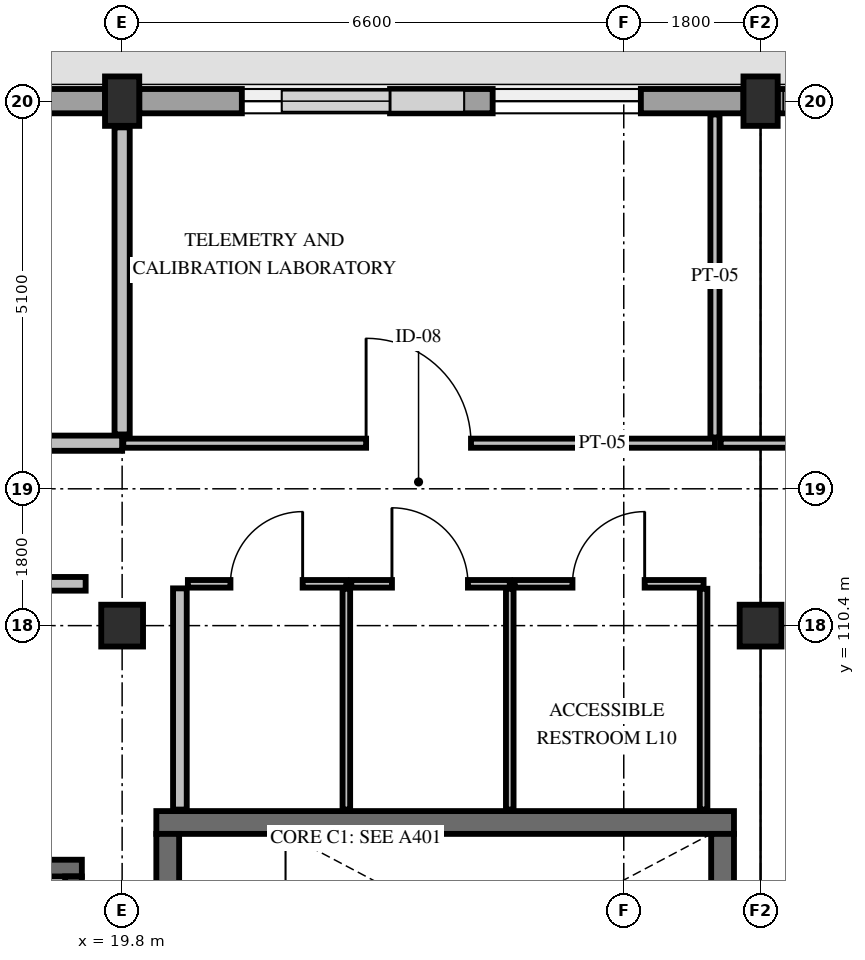
"""IFC4 building model, lengths in metres.
Left out: names, types, materials, properties, quantities, classifications, styles, units other than length and angle.
Written with IfcOpenShell. Run it as: python <this file> out.ifc"""

import sys

from ifc_helpers import new_model, si_unit, direction, frame, frame_2d, origin, origin_2d, place, context, subcontext, project, spatial, rectangle, extrude, element, fill, save


model = new_model("IFC4")
c1 = context("Model", 3, precision=1e-05, world=origin(), true_north=direction((0.0, 1.0)))
c2 = subcontext(c1, "Body", "Model", "MODEL_VIEW")
j1 = project(units=[si_unit("LENGTHUNIT", "METRE"), si_unit("PLANEANGLEUNIT", "RADIAN")], contexts=[c1])
p1 = place(None, origin())
s1 = spatial("IfcSite", under=j1, at=p1, CompositionType="ELEMENT")
p2 = place(p1, origin())
s2 = spatial("IfcBuilding", under=s1, at=p2, CompositionType="ELEMENT")
p3 = place(p2, frame((0.0, 0.0, 46.8)))
s3 = spatial("IfcBuildingStorey", under=s2, at=p3, CompositionType="ELEMENT", Elevation=46.8)
p4 = place(p3, frame((19.8, 110.4, 0.0), z_axis=(0.0, 0.0, 1.0), x_axis=(1.0, 0.0, 0.0)))
e1 = element("IfcColumn", 1, at=p4, inside=s3, PredefinedType="COLUMN", context=c2, shape_type="SweptSolid", body=[
    extrude(rectangle(XDim=0.55, YDim=0.55, at=origin_2d()), origin(), (0.0, 0.0, 1.0), 4.2),
])
p5 = place(p3, frame((19.8, 117.3, 0.0), z_axis=(0.0, 0.0, 1.0), x_axis=(1.0, 0.0, 0.0)))
e2 = element("IfcColumn", 2, at=p5, inside=s3, PredefinedType="PILASTER", context=c2, shape_type="SweptSolid", body=[
    extrude(rectangle(XDim=0.45, YDim=0.65, at=origin_2d()), origin(), (0.0, 0.0, 1.0), 4.2),
])
p6 = place(p3, frame((28.2, 110.4, 0.0), z_axis=(0.0, 0.0, 1.0), x_axis=(1.0, 0.0, 0.0)))
e3 = element("IfcColumn", 3, at=p6, inside=s3, PredefinedType="COLUMN", context=c2, shape_type="SweptSolid", body=[
    extrude(rectangle(XDim=0.55, YDim=0.55, at=origin_2d()), origin(), (0.0, 0.0, 1.0), 4.2),
])
p7 = place(p3, frame((28.2, 117.3, 0.0), z_axis=(0.0, 0.0, 1.0), x_axis=(1.0, 0.0, 0.0)))
e4 = element("IfcColumn", 4, at=p7, inside=s3, PredefinedType="PILASTER", context=c2, shape_type="SweptSolid", body=[
    extrude(rectangle(XDim=0.45, YDim=0.65, at=origin_2d()), origin(), (0.0, 0.0, 1.0), 4.2),
])
p8 = place(p3, frame((13.425, 117.3, 0.0), z_axis=(0.0, 0.0, 1.0), x_axis=(1.0, 0.0, 0.0)))
e5 = element("IfcWall", 5, at=p8, inside=s3, PredefinedType="STANDARD", context=c2, shape_type="SweptSolid", body=[
    extrude(rectangle(XDim=6.15, YDim=0.32, at=frame_2d((3.075, 0.0))), origin(), (0.0, 0.0, 1.0), 3.33),
])
p9 = place(p8, frame((0.75, 0.0, 0.65)))
e6 = element("IfcOpeningElement", 6, at=p9, cuts=e5, PredefinedType="OPENING", context=c2, shape_type="SweptSolid", body=[
    extrude(rectangle(XDim=1.95, YDim=2.24, at=frame_2d((0.975, 1.12))), frame((0.0, 0.175, 0.0), z_axis=(0.0, -1.0, 0.0), x_axis=(1.0, 0.0, 0.0)), (0.0, 0.0, 1.0), 0.35),
])
p10 = place(p8, frame((3.45, 0.0, 0.65)))
e7 = element("IfcOpeningElement", 7, at=p10, cuts=e5, PredefinedType="OPENING", context=c2, shape_type="SweptSolid", body=[
    extrude(rectangle(XDim=1.95, YDim=2.24, at=frame_2d((0.975, 1.12))), frame((0.0, 0.175, 0.0), z_axis=(0.0, -1.0, 0.0), x_axis=(1.0, 0.0, 0.0)), (0.0, 0.0, 1.0), 0.35),
])
p11 = place(p3, frame((20.025, 117.3, 0.0), z_axis=(0.0, 0.0, 1.0), x_axis=(1.0, 0.0, 0.0)))
e8 = element("IfcWall", 8, at=p11, inside=s3, PredefinedType="STANDARD", context=c2, shape_type="SweptSolid", body=[
    extrude(rectangle(XDim=7.95, YDim=0.32, at=frame_2d((3.975, 0.0))), origin(), (0.0, 0.0, 1.0), 3.33),
])
p12 = place(p11, frame((1.35, 0.0, 0.65)))
e9 = element("IfcOpeningElement", 9, at=p12, cuts=e8, PredefinedType="OPENING", context=c2, shape_type="SweptSolid", body=[
    extrude(rectangle(XDim=1.95, YDim=2.24, at=frame_2d((0.975, 1.12))), frame((0.0, 0.175, 0.0), z_axis=(0.0, -1.0, 0.0), x_axis=(1.0, 0.0, 0.0)), (0.0, 0.0, 1.0), 0.35),
])
p13 = place(p11, frame((4.65, 0.0, 0.65)))
e10 = element("IfcOpeningElement", 10, at=p13, cuts=e8, PredefinedType="OPENING", context=c2, shape_type="SweptSolid", body=[
    extrude(rectangle(XDim=1.95, YDim=2.24, at=frame_2d((0.975, 1.12))), frame((0.0, 0.175, 0.0), z_axis=(0.0, -1.0, 0.0), x_axis=(1.0, 0.0, 0.0)), (0.0, 0.0, 1.0), 0.35),
])
p14 = place(p3, frame((28.425, 117.3, 0.0), z_axis=(0.0, 0.0, 1.0), x_axis=(1.0, 0.0, 0.0)))
e11 = element("IfcWall", 11, at=p14, inside=s3, PredefinedType="STANDARD", context=c2, shape_type="SweptSolid", body=[
    extrude(rectangle(XDim=4.35, YDim=0.32, at=frame_2d((2.175, 0.0))), origin(), (0.0, 0.0, 1.0), 3.35),
])
p15 = place(p14, frame((1.2, 0.0, 0.65)))
e12 = element("IfcOpeningElement", 12, at=p15, cuts=e11, PredefinedType="OPENING", context=c2, shape_type="SweptSolid", body=[
    extrude(rectangle(XDim=1.95, YDim=2.24, at=frame_2d((0.975, 1.12))), frame((0.0, 0.175, 0.0), z_axis=(0.0, -1.0, 0.0), x_axis=(1.0, 0.0, 0.0)), (0.0, 0.0, 1.0), 0.35),
])
p16 = place(p3, frame((20.25, 107.81, 0.0), z_axis=(0.0, 0.0, 1.0), x_axis=(1.0, 0.0, 0.0)))
e13 = element("IfcWall", 13, at=p16, inside=s3, PredefinedType="SHEAR", context=c2, shape_type="SweptSolid", body=[
    extrude(rectangle(XDim=7.6, YDim=0.3, at=frame_2d((3.8, 0.0))), origin(), (0.0, 0.0, 1.0), 3.94),
])
p17 = place(p3, frame((20.4, 104.7, 0.0), z_axis=(0.0, 0.0, 1.0), x_axis=(0.0, 1.0, 0.0)))
e14 = element("IfcWall", 14, at=p17, inside=s3, PredefinedType="SHEAR", context=c2, shape_type="SweptSolid", body=[
    extrude(rectangle(XDim=2.96, YDim=0.3, at=frame_2d((1.48, 0.0))), origin(), (0.0, 0.0, 1.0), 3.94),
])
p18 = place(p17, frame((0.92, 0.0, 0.0)))
e15 = element("IfcOpeningElement", 15, at=p18, cuts=e14, PredefinedType="OPENING", context=c2, shape_type="SweptSolid", body=[
    extrude(rectangle(XDim=1.12, YDim=2.2, at=frame_2d((0.56, 1.1))), frame((0.0, 0.165, 0.0), z_axis=(0.0, -1.0, 0.0), x_axis=(1.0, 0.0, 0.0)), (0.0, 0.0, 1.0), 0.33),
])
p19 = place(p3, frame((27.7, 104.7, 0.0), z_axis=(0.0, 0.0, 1.0), x_axis=(0.0, 1.0, 0.0)))
e16 = element("IfcWall", 16, at=p19, inside=s3, PredefinedType="SHEAR", context=c2, shape_type="SweptSolid", body=[
    extrude(rectangle(XDim=2.96, YDim=0.3, at=frame_2d((1.48, 0.0))), origin(), (0.0, 0.0, 1.0), 3.94),
])
p20 = place(p3, frame((16.38, 107.21, 0.0), z_axis=(0.0, 0.0, 1.0), x_axis=(1.0, 0.0, 0.0)))
e17 = element("IfcWall", 17, at=p20, inside=s3, PredefinedType="SHEAR", context=c2, shape_type="SweptSolid", body=[
    extrude(rectangle(XDim=2.89, YDim=0.22, at=frame_2d((1.445, 0.0))), origin(), (0.0, 0.0, 1.0), 3.94),
])
p21 = place(p20, frame((0.845, 0.0, 0.0)))
e18 = element("IfcOpeningElement", 18, at=p21, cuts=e17, PredefinedType="OPENING", context=c2, shape_type="SweptSolid", body=[
    extrude(rectangle(XDim=1.2, YDim=2.2, at=frame_2d((0.6, 1.1))), frame((0.0, 0.125, 0.0), z_axis=(0.0, -1.0, 0.0), x_axis=(1.0, 0.0, 0.0)), (0.0, 0.0, 1.0), 0.25),
])
p22 = place(p3, frame((19.16, 104.7, 0.0), z_axis=(0.0, 0.0, 1.0), x_axis=(0.0, 1.0, 0.0)))
e19 = element("IfcWall", 19, at=p22, inside=s3, PredefinedType="SHEAR", context=c2, shape_type="SweptSolid", body=[
    extrude(rectangle(XDim=2.4, YDim=0.22, at=frame_2d((1.2, 0.0))), origin(), (0.0, 0.0, 1.0), 3.94),
])
p23 = place(p3, frame((13.85, 110.95, 0.0), z_axis=(0.0, 0.0, 1.0), x_axis=(1.0, 0.0, 0.0)))
e20 = element("IfcWall", 20, at=p23, inside=s3, PredefinedType="PARTITIONING", context=c2, shape_type="SweptSolid", body=[
    extrude(rectangle(XDim=5.47, YDim=0.18, at=frame_2d((2.735, 0.0))), origin(), (0.0, 0.0, 1.0), 3.9),
])
p24 = place(p23, frame((1.85, 0.0, 0.0)))
e21 = element("IfcOpeningElement", 21, at=p24, cuts=e20, PredefinedType="OPENING", context=c2, shape_type="SweptSolid", body=[
    extrude(rectangle(XDim=1.6, YDim=2.25, at=frame_2d((0.8, 1.125))), frame((0.0, 0.105, 0.0), z_axis=(0.0, -1.0, 0.0), x_axis=(1.0, 0.0, 0.0)), (0.0, 0.0, 1.0), 0.21),
])
p25 = place(p3, frame((20.56, 107.98, 0.0), z_axis=(0.0, 0.0, 1.0), x_axis=(0.0, 1.0, 0.0)))
e22 = element("IfcWall", 22, at=p25, inside=s3, PredefinedType="PARTITIONING", context=c2, shape_type="SweptSolid", body=[
    extrude(rectangle(XDim=2.91, YDim=0.18, at=frame_2d((1.455, 0.0))), origin(), (0.0, 0.0, 1.0), 3.23),
])
p26 = place(p3, frame((20.665, 110.95, 0.0), z_axis=(0.0, 0.0, 1.0), x_axis=(1.0, 0.0, 0.0)))
e23 = element("IfcWall", 23, at=p26, inside=s3, PredefinedType="PARTITIONING", context=c2, shape_type="SweptSolid", body=[
    extrude(rectangle(XDim=2.085, YDim=0.1, at=frame_2d((1.042, 0.0))), origin(), (0.0, 0.0, 1.0), 3.9),
])
p27 = place(p26, frame((0.56, 0.0, 0.0)))
e24 = element("IfcOpeningElement", 24, at=p27, cuts=e23, PredefinedType="OPENING", context=c2, shape_type="SweptSolid", body=[
    extrude(rectangle(XDim=0.95, YDim=2.15, at=frame_2d((0.475, 1.075))), frame((0.0, 0.065, 0.0), z_axis=(0.0, -1.0, 0.0), x_axis=(1.0, 0.0, 0.0)), (0.0, 0.0, 1.0), 0.13),
])
p28 = place(p3, frame((22.75, 107.98, 0.0), z_axis=(0.0, 0.0, 1.0), x_axis=(0.0, 1.0, 0.0)))
e25 = element("IfcWall", 25, at=p28, inside=s3, PredefinedType="PARTITIONING", context=c2, shape_type="SweptSolid", body=[
    extrude(rectangle(XDim=2.905, YDim=0.1, at=frame_2d((1.453, 0.0))), origin(), (0.0, 0.0, 1.0), 3.23),
])
p29 = place(p3, frame((22.815, 110.95, 0.0), z_axis=(0.0, 0.0, 1.0), x_axis=(1.0, 0.0, 0.0)))
e26 = element("IfcWall", 26, at=p29, inside=s3, PredefinedType="PARTITIONING", context=c2, shape_type="SweptSolid", body=[
    extrude(rectangle(XDim=2.085, YDim=0.1, at=frame_2d((1.042, 0.0))), origin(), (0.0, 0.0, 1.0), 3.9),
])
p30 = place(p29, frame((0.535, 0.0, 0.0)))
e27 = element("IfcOpeningElement", 27, at=p30, cuts=e26, PredefinedType="OPENING", context=c2, shape_type="SweptSolid", body=[
    extrude(rectangle(XDim=1.0, YDim=2.15, at=frame_2d((0.5, 1.075))), frame((0.0, 0.065, 0.0), z_axis=(0.0, -1.0, 0.0), x_axis=(1.0, 0.0, 0.0)), (0.0, 0.0, 1.0), 0.13),
])
p31 = place(p3, frame((24.9, 107.98, 0.0), z_axis=(0.0, 0.0, 1.0), x_axis=(0.0, 1.0, 0.0)))
e28 = element("IfcWall", 28, at=p31, inside=s3, PredefinedType="PARTITIONING", context=c2, shape_type="SweptSolid", body=[
    extrude(rectangle(XDim=2.905, YDim=0.1, at=frame_2d((1.453, 0.0))), origin(), (0.0, 0.0, 1.0), 3.23),
])
p32 = place(p3, frame((24.965, 110.95, 0.0), z_axis=(0.0, 0.0, 1.0), x_axis=(1.0, 0.0, 0.0)))
e29 = element("IfcWall", 29, at=p32, inside=s3, PredefinedType="PARTITIONING", context=c2, shape_type="SweptSolid", body=[
    extrude(rectangle(XDim=2.485, YDim=0.1, at=frame_2d((1.242, 0.0))), origin(), (0.0, 0.0, 1.0), 3.9),
])
p33 = place(p32, frame((0.76, 0.0, 0.0)))
e30 = element("IfcOpeningElement", 30, at=p33, cuts=e29, PredefinedType="OPENING", context=c2, shape_type="SweptSolid", body=[
    extrude(rectangle(XDim=0.95, YDim=2.15, at=frame_2d((0.475, 1.075))), frame((0.0, 0.065, 0.0), z_axis=(0.0, -1.0, 0.0), x_axis=(1.0, 0.0, 0.0)), (0.0, 0.0, 1.0), 0.13),
])
p34 = place(p3, frame((27.45, 107.98, 0.0), z_axis=(0.0, 0.0, 1.0), x_axis=(0.0, 1.0, 0.0)))
e31 = element("IfcWall", 31, at=p34, inside=s3, PredefinedType="PARTITIONING", context=c2, shape_type="SweptSolid", body=[
    extrude(rectangle(XDim=2.905, YDim=0.1, at=frame_2d((1.453, 0.0))), origin(), (0.0, 0.0, 1.0), 3.23),
])
p35 = place(p3, frame((13.315, 112.8, 0.0), z_axis=(0.0, 0.0, 1.0), x_axis=(1.0, 0.0, 0.0)))
e32 = element("IfcWall", 32, at=p35, inside=s3, PredefinedType="PARTITIONING", context=c2, shape_type="SweptSolid", body=[
    extrude(rectangle(XDim=6.485, YDim=0.2, at=frame_2d((3.243, 0.0))), origin(), (0.0, 0.0, 1.0), 3.53),
])
p36 = place(p35, frame((2.305, 0.0, 0.0)))
e33 = element("IfcOpeningElement", 33, at=p36, cuts=e32, PredefinedType="OPENING", context=c2, shape_type="SweptSolid", body=[
    extrude(rectangle(XDim=1.76, YDim=2.35, at=frame_2d((0.88, 1.175))), frame((0.0, 0.115, 0.0), z_axis=(0.0, -1.0, 0.0), x_axis=(1.0, 0.0, 0.0)), (0.0, 0.0, 1.0), 0.23),
])
p37 = place(p3, frame((19.8, 112.915, 0.0), z_axis=(0.0, 0.0, 1.0), x_axis=(0.0, 1.0, 0.0)))
e34 = element("IfcWall", 34, at=p37, inside=s3, PredefinedType="PARTITIONING", context=c2, shape_type="SweptSolid", body=[
    extrude(rectangle(XDim=4.04, YDim=0.2, at=frame_2d((2.02, 0.0))), origin(), (0.0, 0.0, 1.0), 3.53),
])
p38 = place(p3, frame((19.815, 112.8, 0.0), z_axis=(0.0, 0.0, 1.0), x_axis=(1.0, 0.0, 0.0)))
e35 = element("IfcWall", 35, at=p38, inside=s3, PredefinedType="PARTITIONING", context=c2, shape_type="SweptSolid", body=[
    extrude(rectangle(XDim=7.785, YDim=0.12, at=frame_2d((3.893, 0.0))), origin(), (0.0, 0.0, 1.0), 3.53),
])
p39 = place(p38, frame((3.195, 0.0, 0.0)))
e36 = element("IfcOpeningElement", 36, at=p39, cuts=e35, PredefinedType="OPENING", context=c2, shape_type="SweptSolid", body=[
    extrude(rectangle(XDim=1.38, YDim=2.25, at=frame_2d((0.69, 1.125))), frame((0.0, 0.075, 0.0), z_axis=(0.0, -1.0, 0.0), x_axis=(1.0, 0.0, 0.0)), (0.0, 0.0, 1.0), 0.15),
])
p40 = place(p3, frame((27.6, 112.875, 0.0), z_axis=(0.0, 0.0, 1.0), x_axis=(0.0, 1.0, 0.0)))
e37 = element("IfcWall", 37, at=p40, inside=s3, PredefinedType="PARTITIONING", context=c2, shape_type="SweptSolid", body=[
    extrude(rectangle(XDim=4.25, YDim=0.12, at=frame_2d((2.125, 0.0))), origin(), (0.0, 0.0, 1.0), 3.33),
])
p41 = place(p3, frame((27.675, 112.8, 0.0), z_axis=(0.0, 0.0, 1.0), x_axis=(1.0, 0.0, 0.0)))
e38 = element("IfcWall", 38, at=p41, inside=s3, PredefinedType="PARTITIONING", context=c2, shape_type="SweptSolid", body=[
    extrude(rectangle(XDim=9.525, YDim=0.12, at=frame_2d((4.762, 0.0))), origin(), (0.0, 0.0, 1.0), 3.53),
])
p42 = place(p41, frame((6.035, 0.0, 0.0)))
e39 = element("IfcOpeningElement", 39, at=p42, cuts=e38, PredefinedType="OPENING", context=c2, shape_type="SweptSolid", body=[
    extrude(rectangle(XDim=1.68, YDim=2.3, at=frame_2d((0.84, 1.15))), frame((0.0, 0.075, 0.0), z_axis=(0.0, -1.0, 0.0), x_axis=(1.0, 0.0, 0.0)), (0.0, 0.0, 1.0), 0.15),
])
p43 = place(p12, origin())
e40 = element("IfcWindow", 40, at=p43, inside=s3, PartitioningType="DOUBLE_PANEL_VERTICAL", PredefinedType="WINDOW", context=c2, shape_type="SweptSolid", body=[
    extrude(rectangle(XDim=1.95, YDim=2.24, at=frame_2d((0.975, 1.12))), frame((0.0, 0.03, 0.0), z_axis=(0.0, -1.0, 0.0), x_axis=(1.0, 0.0, 0.0)), (0.0, 0.0, 1.0), 0.06),
])
fill(e9, e40)
p44 = place(p13, origin())
e41 = element("IfcWindow", 41, at=p44, inside=s3, PartitioningType="DOUBLE_PANEL_VERTICAL", PredefinedType="WINDOW", context=c2, shape_type="SweptSolid", body=[
    extrude(rectangle(XDim=1.95, YDim=2.24, at=frame_2d((0.975, 1.12))), frame((0.0, 0.03, 0.0), z_axis=(0.0, -1.0, 0.0), x_axis=(1.0, 0.0, 0.0)), (0.0, 0.0, 1.0), 0.06),
])
fill(e10, e41)
p45 = place(p27, origin())
e42 = element("IfcDoor", 42, at=p45, inside=s3, OperationType="SINGLE_SWING_RIGHT", PredefinedType="DOOR", context=c2, shape_type="SweptSolid", body=[
    extrude(rectangle(XDim=0.95, YDim=2.15, at=frame_2d((0.475, 1.075))), frame((0.0, 0.025, 0.0), z_axis=(0.0, -1.0, 0.0), x_axis=(1.0, 0.0, 0.0)), (0.0, 0.0, 1.0), 0.05),
])
fill(e24, e42)
p46 = place(p30, origin())
e43 = element("IfcDoor", 43, at=p46, inside=s3, OperationType="SINGLE_SWING_LEFT", PredefinedType="DOOR", context=c2, shape_type="SweptSolid", body=[
    extrude(rectangle(XDim=1.0, YDim=2.15, at=frame_2d((0.5, 1.075))), frame((0.0, 0.025, 0.0), z_axis=(0.0, -1.0, 0.0), x_axis=(1.0, 0.0, 0.0)), (0.0, 0.0, 1.0), 0.05),
])
fill(e27, e43)
p47 = place(p33, origin())
e44 = element("IfcDoor", 44, at=p47, inside=s3, OperationType="SINGLE_SWING_RIGHT", PredefinedType="DOOR", context=c2, shape_type="SweptSolid", body=[
    extrude(rectangle(XDim=0.95, YDim=2.15, at=frame_2d((0.475, 1.075))), frame((0.0, 0.025, 0.0), z_axis=(0.0, -1.0, 0.0), x_axis=(1.0, 0.0, 0.0)), (0.0, 0.0, 1.0), 0.05),
])
fill(e30, e44)
p48 = place(p39, origin())
e45 = element("IfcDoor", 45, at=p48, inside=s3, OperationType="SINGLE_SWING_LEFT", PredefinedType="DOOR", context=c2, shape_type="SweptSolid", body=[
    extrude(rectangle(XDim=1.38, YDim=2.25, at=frame_2d((0.69, 1.125))), frame((0.0, 0.025, 0.0), z_axis=(0.0, -1.0, 0.0), x_axis=(1.0, 0.0, 0.0)), (0.0, 0.0, 1.0), 0.05),
])
fill(e36, e45)
save(model, sys.argv[1])
